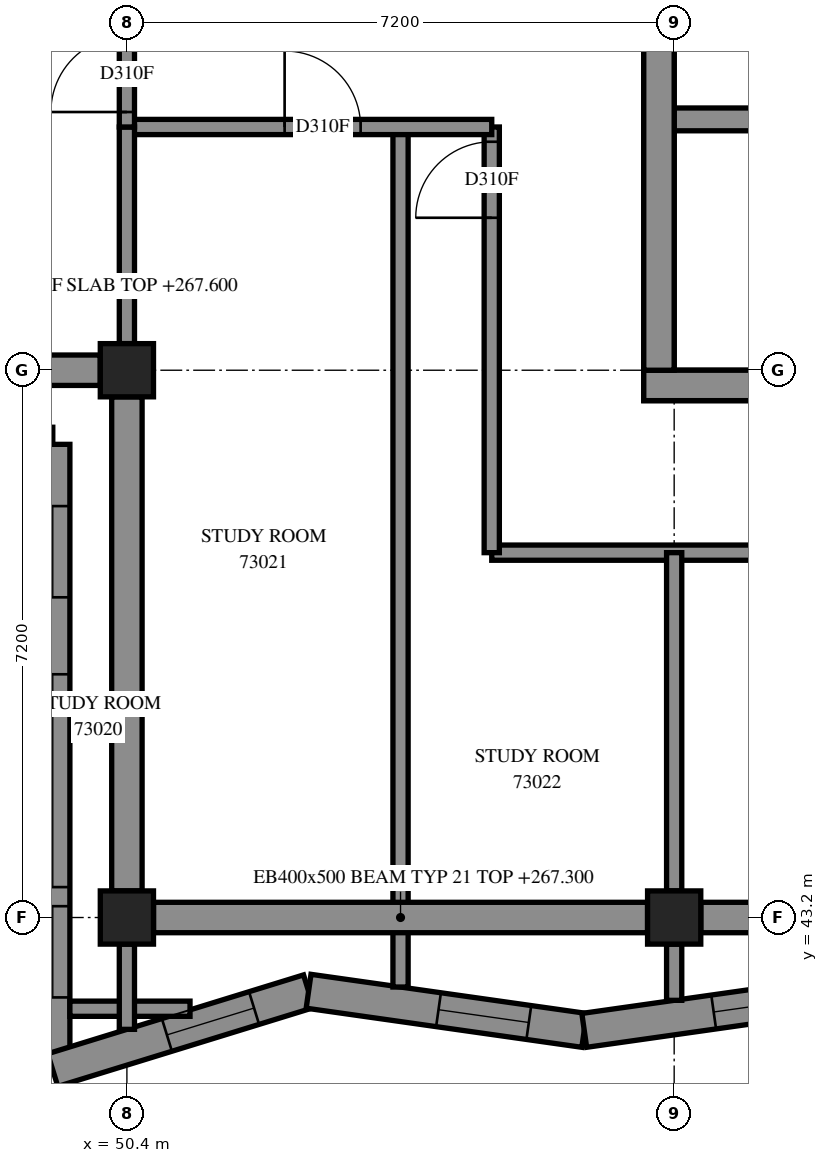
"""IFC4 building model, lengths in metres.
Left out: names, types, materials, properties, quantities, classifications, styles, units other than length and angle.
Written with IfcOpenShell. Run it as: python <this file> out.ifc"""

import sys

from ifc_helpers import new_model, si_unit, direction, frame, frame_2d, origin, origin_2d, place, context, subcontext, project, spatial, polyline, rectangle, outline, extrude, element, fill, save


model = new_model("IFC4")
c1 = context("Model", 3, precision=1e-05, world=origin(), true_north=direction((0.0, 1.0)))
c2 = subcontext(c1, "Body", "Model", "MODEL_VIEW")
j1 = project(units=[si_unit("LENGTHUNIT", "METRE"), si_unit("PLANEANGLEUNIT", "RADIAN")], contexts=[c1])
p1 = place(None, origin())
s1 = spatial("IfcSite", under=j1, at=p1, CompositionType="ELEMENT")
p2 = place(p1, origin())
s2 = spatial("IfcBuilding", under=s1, at=p2, CompositionType="ELEMENT")
p3 = place(p2, frame((0.0, 0.0, 267.6)))
s3 = spatial("IfcBuildingStorey", under=s2, at=p3, CompositionType="ELEMENT", Elevation=267.6)
for number, where, z_axis, x_axis in (
    (1, (50.4, 43.2, 0.0), (0.0, 0.0, 1.0), (1.0, 0.0, 0.0)),
    (2, (50.4, 50.4, 0.0), (0.0, 0.0, 1.0), (1.0, 0.0, 0.0)),
    (3, (57.6, 43.2, 0.0), (0.0, 0.0, 1.0), (1.0, 0.0, 0.0)),
):
    element("IfcColumn", number, at=place(p3, frame(where, z_axis=z_axis, x_axis=x_axis)), inside=s3, PredefinedType="COLUMN", context=c2, shape_type="SweptSolid", body=[
        extrude(rectangle(XDim=0.7, YDim=0.7, at=origin_2d()), origin(), (0.0, 0.0, 1.0), 3.1),
    ])
p4 = place(p3, frame((57.2, 50.2, -0.3), z_axis=(0.0, 0.0, 1.0), x_axis=(1.0, 0.0, 0.0)))
e4 = element("IfcWall", 4, at=p4, inside=s3, PredefinedType="SHEAR", context=c2, shape_type="SweptSolid", body=[
    extrude(rectangle(XDim=15.2, YDim=0.4, at=frame_2d((7.6, 0.0))), origin(), (0.0, 0.0, 1.0), 2.7),
])
p5 = place(p3, frame((57.4, 50.4, -0.3), z_axis=(0.0, 0.0, 1.0), x_axis=(0.0, 1.0, 0.0)))
e5 = element("IfcWall", 5, at=p5, inside=s3, PredefinedType="SHEAR", context=c2, shape_type="SweptSolid", body=[
    extrude(rectangle(XDim=14.4, YDim=0.4, at=frame_2d((7.2, 0.0))), origin(), (0.0, 0.0, 1.0), 2.7),
])
p6 = place(p5, frame((4.55, 0.0, 0.3)))
e6 = element("IfcOpeningElement", 6, at=p6, cuts=e5, PredefinedType="OPENING", context=c2, shape_type="SweptSolid", body=[
    extrude(rectangle(XDim=1.1, YDim=2.1, at=frame_2d((0.55, 1.05))), frame((0.0, 0.21, 0.0), z_axis=(0.0, -1.0, 0.0), x_axis=(1.0, 0.0, 0.0)), (0.0, 0.0, 1.0), 0.42),
])
p7 = place(p5, frame((11.35, 0.0, 0.3)))
e7 = element("IfcOpeningElement", 7, at=p7, cuts=e5, PredefinedType="OPENING", context=c2, shape_type="SweptSolid", body=[
    extrude(rectangle(XDim=1.1, YDim=2.1, at=frame_2d((0.55, 1.05))), frame((0.0, 0.21, 0.0), z_axis=(0.0, -1.0, 0.0), x_axis=(1.0, 0.0, 0.0)), (0.0, 0.0, 1.0), 0.42),
])
p8 = place(p3, frame((57.6, 53.7, 0.0), z_axis=(0.0, 0.0, 1.0), x_axis=(1.0, 0.0, 0.0)))
e8 = element("IfcWall", 8, at=p8, inside=s3, PredefinedType="SOLIDWALL", context=c2, shape_type="SweptSolid", body=[
    extrude(rectangle(XDim=14.4, YDim=0.3, at=frame_2d((7.2, 0.0))), origin(), (0.0, 0.0, 1.0), 3.1),
])
p9 = place(p8, frame((1.35, 0.0, 0.0)))
e9 = element("IfcOpeningElement", 9, at=p9, cuts=e8, PredefinedType="OPENING", context=c2, shape_type="SweptSolid", body=[
    extrude(rectangle(XDim=0.9, YDim=2.1, at=frame_2d((0.45, 1.05))), frame((0.0, 0.16, 0.0), z_axis=(0.0, -1.0, 0.0), x_axis=(1.0, 0.0, 0.0)), (0.0, 0.0, 1.0), 0.32),
])
p10 = place(p8, frame((4.95, 0.0, 0.0)))
e10 = element("IfcOpeningElement", 10, at=p10, cuts=e8, PredefinedType="OPENING", context=c2, shape_type="SweptSolid", body=[
    extrude(rectangle(XDim=0.9, YDim=2.1, at=frame_2d((0.45, 1.05))), frame((0.0, 0.16, 0.0), z_axis=(0.0, -1.0, 0.0), x_axis=(1.0, 0.0, 0.0)), (0.0, 0.0, 1.0), 0.32),
])
p11 = place(p8, frame((8.55, 0.0, 0.0)))
e11 = element("IfcOpeningElement", 11, at=p11, cuts=e8, PredefinedType="OPENING", context=c2, shape_type="SweptSolid", body=[
    extrude(rectangle(XDim=0.9, YDim=2.1, at=frame_2d((0.45, 1.05))), frame((0.0, 0.16, 0.0), z_axis=(0.0, -1.0, 0.0), x_axis=(1.0, 0.0, 0.0)), (0.0, 0.0, 1.0), 0.32),
])
p12 = place(p8, frame((12.05, 0.0, 0.0)))
e12 = element("IfcOpeningElement", 12, at=p12, cuts=e8, PredefinedType="OPENING", context=c2, shape_type="SweptSolid", body=[
    extrude(rectangle(XDim=1.1, YDim=2.1, at=frame_2d((0.55, 1.05))), frame((0.0, 0.16, 0.0), z_axis=(0.0, -1.0, 0.0), x_axis=(1.0, 0.0, 0.0)), (0.0, 0.0, 1.0), 0.32),
])
p13 = place(p3, frame((42.225, 49.425, 0.0), z_axis=(0.0, 0.0, 1.0), x_axis=(1.0, 0.0, 0.0)))
e13 = element("IfcWall", 13, at=p13, inside=s3, PredefinedType="SOLIDWALL", context=c2, shape_type="SweptSolid", body=[
    extrude(outline(polyline([(-0.225, -0.225), (6.975, -0.225), (7.425, 0.225), (0.225, 0.225), (-0.225, -0.225)])), origin(), (0.0, 0.0, 1.0), 3.1),
])
p14 = place(p13, frame((1.375, 0.0, 0.45)))
e14 = element("IfcOpeningElement", 14, at=p14, cuts=e13, PredefinedType="OPENING", context=c2, shape_type="SweptSolid", body=[
    extrude(rectangle(XDim=2.8, YDim=2.55, at=frame_2d((1.4, 1.275))), frame((0.0, 0.235, 0.0), z_axis=(0.0, -1.0, 0.0), x_axis=(1.0, 0.0, 0.0)), (0.0, 0.0, 1.0), 0.47),
])
p15 = place(p13, frame((5.188, 0.0, 0.45)))
e15 = element("IfcOpeningElement", 15, at=p15, cuts=e13, PredefinedType="OPENING", context=c2, shape_type="SweptSolid", body=[
    extrude(rectangle(XDim=1.2, YDim=2.55, at=frame_2d((0.6, 1.275))), frame((0.0, 0.235, 0.0), z_axis=(0.0, -1.0, 0.0), x_axis=(1.0, 0.0, 0.0)), (0.0, 0.0, 1.0), 0.47),
])
p16 = place(p3, frame((49.425, 49.425, 0.0), z_axis=(0.0, 0.0, 1.0), x_axis=(0.0, -1.0, 0.0)))
e16 = element("IfcWall", 16, at=p16, inside=s3, PredefinedType="SOLIDWALL", context=c2, shape_type="SweptSolid", body=[
    extrude(outline(polyline([(0.225, -0.225), (8.537, -0.225), (7.927, 0.225), (-0.225, 0.225), (0.225, -0.225)])), origin(), (0.0, 0.0, 1.0), 3.1),
])
p17 = place(p16, frame((3.025, 0.0, 0.45)))
e17 = element("IfcOpeningElement", 17, at=p17, cuts=e16, PredefinedType="OPENING", context=c2, shape_type="SweptSolid", body=[
    extrude(rectangle(XDim=2.8, YDim=2.55, at=frame_2d((1.4, 1.275))), frame((0.0, 0.235, 0.0), z_axis=(0.0, -1.0, 0.0), x_axis=(1.0, 0.0, 0.0)), (0.0, 0.0, 1.0), 0.47),
])
p18 = place(p16, frame((0.812, 0.0, 0.45)))
e18 = element("IfcOpeningElement", 18, at=p18, cuts=e16, PredefinedType="OPENING", context=c2, shape_type="SweptSolid", body=[
    extrude(rectangle(XDim=1.2, YDim=2.55, at=frame_2d((0.6, 1.275))), frame((0.0, 0.235, 0.0), z_axis=(0.0, -1.0, 0.0), x_axis=(1.0, 0.0, 0.0)), (0.0, 0.0, 1.0), 0.47),
])
p19 = place(p16, frame((6.076, 0.0, 0.45)))
e19 = element("IfcOpeningElement", 19, at=p19, cuts=e16, PredefinedType="OPENING", context=c2, shape_type="SweptSolid", body=[
    extrude(rectangle(XDim=1.2, YDim=2.55, at=frame_2d((0.6, 1.275))), frame((0.0, 0.235, 0.0), z_axis=(0.0, -1.0, 0.0), x_axis=(1.0, 0.0, 0.0)), (0.0, 0.0, 1.0), 0.47),
])
p20 = place(p3, frame((49.425, 41.193, 0.0), z_axis=(0.0, 0.0, 1.0), x_axis=(0.9556573555, 0.2944809312, 0.0)))
e20 = element("IfcWall", 20, at=p20, inside=s3, PredefinedType="SOLIDWALL", context=c2, shape_type="SweptSolid", body=[
    extrude(outline(polyline([(-0.305, -0.225), (3.471, -0.225), (3.572, 0.225), (0.305, 0.225), (-0.305, -0.225)])), origin(), (0.0, 0.0, 1.0), 3.1),
])
p21 = place(p20, frame((1.571, 0.0, 0.45)))
e21 = element("IfcOpeningElement", 21, at=p21, cuts=e20, PredefinedType="OPENING", context=c2, shape_type="SweptSolid", body=[
    extrude(rectangle(XDim=1.2, YDim=2.55, at=frame_2d((0.6, 1.275))), frame((0.0, 0.235, 0.0), z_axis=(0.0, -1.0, 0.0), x_axis=(1.0, 0.0, 0.0)), (0.0, 0.0, 1.0), 0.47),
])
p22 = place(p3, frame((52.79, 42.23, 0.0), z_axis=(0.0, 0.0, 1.0), x_axis=(0.9900866168, -0.1404581477, 0.0)))
e22 = element("IfcWall", 22, at=p22, inside=s3, PredefinedType="SOLIDWALL", context=c2, shape_type="SweptSolid", body=[
    extrude(outline(polyline([(0.05, -0.225), (3.695, -0.225), (3.631, 0.225), (-0.05, 0.225), (0.05, -0.225)])), origin(), (0.0, 0.0, 1.0), 3.1),
])
p23 = place(p22, frame((1.726, 0.0, 0.45)))
e23 = element("IfcOpeningElement", 23, at=p23, cuts=e22, PredefinedType="OPENING", context=c2, shape_type="SweptSolid", body=[
    extrude(rectangle(XDim=1.2, YDim=2.55, at=frame_2d((0.6, 1.275))), frame((0.0, 0.235, 0.0), z_axis=(0.0, -1.0, 0.0), x_axis=(1.0, 0.0, 0.0)), (0.0, 0.0, 1.0), 0.47),
])
p24 = place(p3, frame((56.417, 41.715, 0.0), z_axis=(0.0, 0.0, 1.0), x_axis=(0.9900834903, 0.1404801848, 0.0)))
e24 = element("IfcWall", 24, at=p24, inside=s3, PredefinedType="SOLIDWALL", context=c2, shape_type="SweptSolid", body=[
    extrude(outline(polyline([(-0.032, -0.225), (3.613, -0.225), (3.677, 0.225), (0.032, 0.225), (-0.032, -0.225)])), origin(), (0.0, 0.0, 1.0), 3.1),
])
p25 = place(p24, frame((1.72, 0.0, 0.45)))
e25 = element("IfcOpeningElement", 25, at=p25, cuts=e24, PredefinedType="OPENING", context=c2, shape_type="SweptSolid", body=[
    extrude(rectangle(XDim=1.2, YDim=2.55, at=frame_2d((0.6, 1.275))), frame((0.0, 0.235, 0.0), z_axis=(0.0, -1.0, 0.0), x_axis=(1.0, 0.0, 0.0)), (0.0, 0.0, 1.0), 0.47),
])
p26 = place(p3, frame((55.2, 48.0, 0.0), z_axis=(0.0, 0.0, 1.0), x_axis=(1.0, 0.0, 0.0)))
e26 = element("IfcWall", 26, at=p26, inside=s3, PredefinedType="PARTITIONING", context=c2, shape_type="SweptSolid", body=[
    extrude(rectangle(XDim=19.15, YDim=0.2, at=frame_2d((9.575, 0.0))), origin(), (0.0, 0.0, 1.0), 3.1),
])
p27 = place(p26, frame((4.475, 0.0, 0.0)))
e27 = element("IfcOpeningElement", 27, at=p27, cuts=e26, PredefinedType="OPENING", context=c2, shape_type="SweptSolid", body=[
    extrude(rectangle(XDim=1.0, YDim=2.1, at=frame_2d((0.5, 1.05))), frame((0.0, 0.11, 0.0), z_axis=(0.0, -1.0, 0.0), x_axis=(1.0, 0.0, 0.0)), (0.0, 0.0, 1.0), 0.22),
])
p28 = place(p26, frame((8.301, 0.0, 0.0)))
e28 = element("IfcOpeningElement", 28, at=p28, cuts=e26, PredefinedType="OPENING", context=c2, shape_type="SweptSolid", body=[
    extrude(rectangle(XDim=0.9, YDim=2.1, at=frame_2d((0.45, 1.05))), frame((0.0, 0.11, 0.0), z_axis=(0.0, -1.0, 0.0), x_axis=(1.0, 0.0, 0.0)), (0.0, 0.0, 1.0), 0.22),
])
p29 = place(p26, frame((13.707, 0.0, 0.0)))
e29 = element("IfcOpeningElement", 29, at=p29, cuts=e26, PredefinedType="OPENING", context=c2, shape_type="SweptSolid", body=[
    extrude(rectangle(XDim=1.0, YDim=2.1, at=frame_2d((0.5, 1.05))), frame((0.0, 0.11, 0.0), z_axis=(0.0, -1.0, 0.0), x_axis=(1.0, 0.0, 0.0)), (0.0, 0.0, 1.0), 0.22),
])
p30 = place(p3, frame((54.0, 42.285, 0.0), z_axis=(0.0, 0.0, 1.0), x_axis=(0.0, 1.0, 0.0)))
e30 = element("IfcWall", 30, at=p30, inside=s3, PredefinedType="PARTITIONING", context=c2, shape_type="SweptSolid", body=[
    extrude(rectangle(XDim=11.315, YDim=0.2, at=frame_2d((5.657, 0.0))), origin(), (0.0, 0.0, 1.0), 3.1),
])
p31 = place(p3, frame((50.4, 43.55, 0.0), z_axis=(0.0, 0.0, 1.0), x_axis=(0.0, 1.0, 0.0)))
e31 = element("IfcWall", 31, at=p31, inside=s3, PredefinedType="PARTITIONING", context=c2, shape_type="SweptSolid", body=[
    extrude(rectangle(XDim=6.5, YDim=0.2, at=frame_2d((3.25, 0.0))), origin(), (0.0, 0.0, 1.0), 2.6),
])
p32 = place(p3, frame((55.2, 48.0, 0.0), z_axis=(0.0, 0.0, 1.0), x_axis=(0.0, 1.0, 0.0)))
e32 = element("IfcWall", 32, at=p32, inside=s3, PredefinedType="PARTITIONING", context=c2, shape_type="SweptSolid", body=[
    extrude(rectangle(XDim=5.6, YDim=0.2, at=frame_2d((2.8, 0.0))), origin(), (0.0, 0.0, 1.0), 3.1),
])
p33 = place(p32, frame((4.406, 0.0, 0.0)))
e33 = element("IfcOpeningElement", 33, at=p33, cuts=e32, PredefinedType="OPENING", context=c2, shape_type="SweptSolid", body=[
    extrude(rectangle(XDim=1.0, YDim=2.1, at=frame_2d((0.5, 1.05))), frame((0.0, 0.11, 0.0), z_axis=(0.0, -1.0, 0.0), x_axis=(1.0, 0.0, 0.0)), (0.0, 0.0, 1.0), 0.22),
])
p34 = place(p3, frame((50.4, 53.6, 0.0), z_axis=(0.0, 0.0, 1.0), x_axis=(1.0, 0.0, 0.0)))
e34 = element("IfcWall", 34, at=p34, inside=s3, PredefinedType="PARTITIONING", context=c2, shape_type="SweptSolid", body=[
    extrude(rectangle(XDim=4.8, YDim=0.2, at=frame_2d((2.4, 0.0))), origin(), (0.0, 0.0, 1.0), 3.1),
])
p35 = place(p34, frame((2.075, 0.0, 0.0)))
e35 = element("IfcOpeningElement", 35, at=p35, cuts=e34, PredefinedType="OPENING", context=c2, shape_type="SweptSolid", body=[
    extrude(rectangle(XDim=1.0, YDim=2.1, at=frame_2d((0.5, 1.05))), frame((0.0, 0.11, 0.0), z_axis=(0.0, -1.0, 0.0), x_axis=(1.0, 0.0, 0.0)), (0.0, 0.0, 1.0), 0.22),
])
p36 = place(p3, frame((57.6, 43.55, 0.0), z_axis=(0.0, 0.0, 1.0), x_axis=(0.0, 1.0, 0.0)))
e36 = element("IfcWall", 36, at=p36, inside=s3, PredefinedType="PARTITIONING", context=c2, shape_type="SweptSolid", body=[
    extrude(rectangle(XDim=4.45, YDim=0.2, at=frame_2d((2.225, 0.0))), origin(), (0.0, 0.0, 1.0), 3.1),
])
p37 = place(p3, frame((50.4, 50.75, 0.0), z_axis=(0.0, 0.0, 1.0), x_axis=(0.0, 1.0, 0.0)))
e37 = element("IfcWall", 37, at=p37, inside=s3, PredefinedType="PARTITIONING", context=c2, shape_type="SweptSolid", body=[
    extrude(rectangle(XDim=2.85, YDim=0.2, at=frame_2d((1.425, 0.0))), origin(), (0.0, 0.0, 1.0), 3.1),
])
p38 = place(p3, frame((50.4, 53.6, 0.0), z_axis=(0.0, 0.0, 1.0), x_axis=(0.0, 1.0, 0.0)))
e38 = element("IfcWall", 38, at=p38, inside=s3, PredefinedType="PARTITIONING", context=c2, shape_type="SweptSolid", body=[
    extrude(rectangle(XDim=2.0, YDim=0.2, at=frame_2d((1.0, 0.0))), origin(), (0.0, 0.0, 1.0), 3.1),
])
p39 = place(p38, frame((0.197, 0.0, 0.0)))
e39 = element("IfcOpeningElement", 39, at=p39, cuts=e38, PredefinedType="OPENING", context=c2, shape_type="SweptSolid", body=[
    extrude(rectangle(XDim=1.0, YDim=2.1, at=frame_2d((0.5, 1.05))), frame((0.0, 0.11, 0.0), z_axis=(0.0, -1.0, 0.0), x_axis=(1.0, 0.0, 0.0)), (0.0, 0.0, 1.0), 0.22),
])
p40 = place(p3, frame((49.65, 42.0, 0.0), z_axis=(0.0, 0.0, 1.0), x_axis=(1.0, 0.0, 0.0)))
e40 = element("IfcWall", 40, at=p40, inside=s3, PredefinedType="PARTITIONING", context=c2, shape_type="SweptSolid", body=[
    extrude(rectangle(XDim=1.581, YDim=0.2, at=frame_2d((0.79, 0.0))), origin(), (0.0, 0.0, 1.0), 3.1),
])
p41 = place(p3, frame((50.4, 41.729, 0.0), z_axis=(0.0, 0.0, 1.0), x_axis=(0.0, 1.0, 0.0)))
e41 = element("IfcWall", 41, at=p41, inside=s3, PredefinedType="PARTITIONING", context=c2, shape_type="SweptSolid", body=[
    extrude(rectangle(XDim=1.121, YDim=0.2, at=frame_2d((0.561, 0.0))), origin(), (0.0, 0.0, 1.0), 3.1),
])
p42 = place(p3, frame((57.6, 42.11, 0.0), z_axis=(0.0, 0.0, 1.0), x_axis=(0.0, 1.0, 0.0)))
e42 = element("IfcWall", 42, at=p42, inside=s3, PredefinedType="PARTITIONING", context=c2, shape_type="SweptSolid", body=[
    extrude(rectangle(XDim=0.74, YDim=0.2, at=frame_2d((0.37, 0.0))), origin(), (0.0, 0.0, 1.0), 3.1),
])
p43 = place(p17, origin())
e43 = element("IfcWindow", 43, at=p43, inside=s3, PartitioningType="SINGLE_PANEL", PredefinedType="WINDOW", context=c2, shape_type="SweptSolid", body=[
    extrude(rectangle(XDim=2.8, YDim=2.55, at=frame_2d((1.4, 1.275))), frame((0.0, 0.205, 0.0), z_axis=(0.0, -1.0, 0.0), x_axis=(1.0, 0.0, 0.0)), (0.0, 0.0, 1.0), 0.06),
])
fill(e17, e43)
p44 = place(p18, origin())
e44 = element("IfcWindow", 44, at=p44, inside=s3, PartitioningType="SINGLE_PANEL", PredefinedType="WINDOW", context=c2, shape_type="SweptSolid", body=[
    extrude(rectangle(XDim=1.2, YDim=2.55, at=frame_2d((0.6, 1.275))), frame((0.0, 0.205, 0.0), z_axis=(0.0, -1.0, 0.0), x_axis=(1.0, 0.0, 0.0)), (0.0, 0.0, 1.0), 0.06),
])
fill(e18, e44)
p45 = place(p19, origin())
e45 = element("IfcWindow", 45, at=p45, inside=s3, PartitioningType="SINGLE_PANEL", PredefinedType="WINDOW", context=c2, shape_type="SweptSolid", body=[
    extrude(rectangle(XDim=1.2, YDim=2.55, at=frame_2d((0.6, 1.275))), frame((0.0, 0.205, 0.0), z_axis=(0.0, -1.0, 0.0), x_axis=(1.0, 0.0, 0.0)), (0.0, 0.0, 1.0), 0.06),
])
fill(e19, e45)
p46 = place(p21, origin())
e46 = element("IfcWindow", 46, at=p46, inside=s3, PartitioningType="SINGLE_PANEL", PredefinedType="WINDOW", context=c2, shape_type="SweptSolid", body=[
    extrude(rectangle(XDim=1.2, YDim=2.55, at=frame_2d((0.6, 1.275))), frame((0.0, 0.105, 0.0), z_axis=(0.0, -1.0, 0.0), x_axis=(1.0, 0.0, 0.0)), (0.0, 0.0, 1.0), 0.06),
])
fill(e21, e46)
p47 = place(p23, origin())
e47 = element("IfcWindow", 47, at=p47, inside=s3, PartitioningType="SINGLE_PANEL", PredefinedType="WINDOW", context=c2, shape_type="SweptSolid", body=[
    extrude(rectangle(XDim=1.2, YDim=2.55, at=frame_2d((0.6, 1.275))), frame((0.0, 0.205, 0.0), z_axis=(0.0, -1.0, 0.0), x_axis=(1.0, 0.0, 0.0)), (0.0, 0.0, 1.0), 0.06),
])
fill(e23, e47)
p48 = place(p25, origin())
e48 = element("IfcWindow", 48, at=p48, inside=s3, PartitioningType="SINGLE_PANEL", PredefinedType="WINDOW", context=c2, shape_type="SweptSolid", body=[
    extrude(rectangle(XDim=1.2, YDim=2.55, at=frame_2d((0.6, 1.275))), frame((0.0, 0.205, 0.0), z_axis=(0.0, -1.0, 0.0), x_axis=(1.0, 0.0, 0.0)), (0.0, 0.0, 1.0), 0.06),
])
fill(e25, e48)
p49 = place(p39, origin())
e49 = element("IfcDoor", 49, at=p49, inside=s3, OperationType="SINGLE_SWING_LEFT", PredefinedType="DOOR", context=c2, shape_type="SweptSolid", body=[
    extrude(rectangle(XDim=1.0, YDim=2.1, at=frame_2d((0.5, 1.05))), frame((0.0, 0.025, 0.0), z_axis=(0.0, -1.0, 0.0), x_axis=(1.0, 0.0, 0.0)), (0.0, 0.0, 1.0), 0.05),
])
fill(e39, e49)
p50 = place(p35, origin())
e50 = element("IfcDoor", 50, at=p50, inside=s3, OperationType="SINGLE_SWING_LEFT", PredefinedType="DOOR", context=c2, shape_type="SweptSolid", body=[
    extrude(rectangle(XDim=1.0, YDim=2.1, at=frame_2d((0.5, 1.05))), frame((0.0, 0.025, 0.0), z_axis=(0.0, -1.0, 0.0), x_axis=(1.0, 0.0, 0.0)), (0.0, 0.0, 1.0), 0.05),
])
fill(e35, e50)
p51 = place(p33, origin())
e51 = element("IfcDoor", 51, at=p51, inside=s3, OperationType="SINGLE_SWING_RIGHT", PredefinedType="DOOR", context=c2, shape_type="SweptSolid", body=[
    extrude(rectangle(XDim=1.0, YDim=2.1, at=frame_2d((0.5, 1.05))), frame((0.0, 0.025, 0.0), z_axis=(0.0, -1.0, 0.0), x_axis=(1.0, 0.0, 0.0)), (0.0, 0.0, 1.0), 0.05),
])
fill(e33, e51)
save(model, sys.argv[1])
